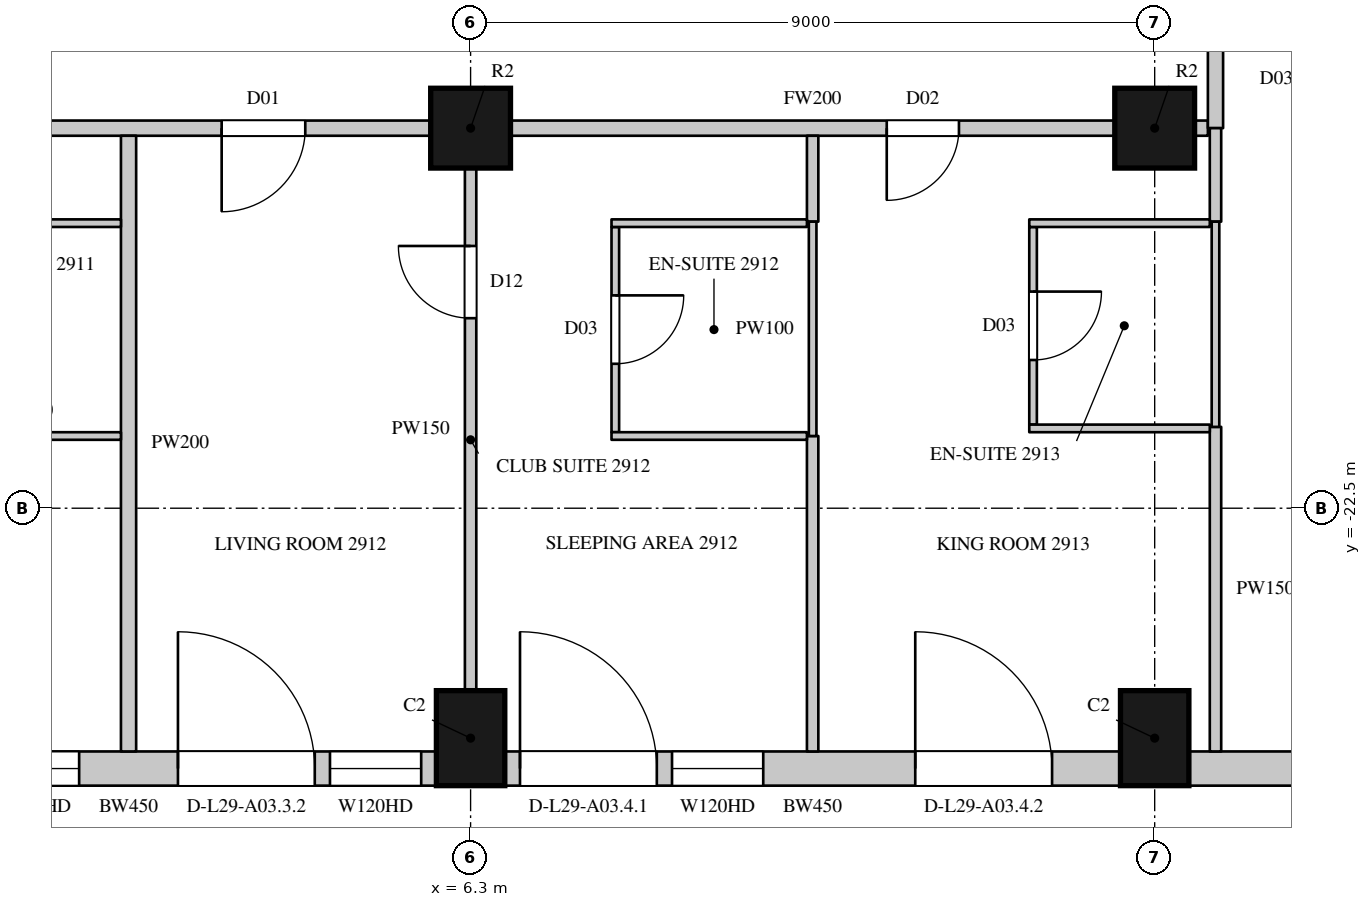
"""IFC4 building model, lengths in metres.
Left out: names, types, materials, properties, quantities, classifications, styles, units other than length and angle.
Written with IfcOpenShell. Run it as: python <this file> out.ifc"""

import sys

from ifc_helpers import new_model, si_unit, direction, frame, frame_2d, origin, origin_2d, place, context, subcontext, project, spatial, rectangle, circle, extrude, element, fill, save


model = new_model("IFC4")
c1 = context("Model", 3, precision=1e-05, world=origin(), true_north=direction((0.0, 1.0)))
c2 = subcontext(c1, "Body", "Model", "MODEL_VIEW")
j1 = project(units=[si_unit("LENGTHUNIT", "METRE"), si_unit("PLANEANGLEUNIT", "RADIAN")], contexts=[c1])
p1 = place(None, origin())
s1 = spatial("IfcSite", under=j1, at=p1, CompositionType="ELEMENT")
p2 = place(p1, origin())
s2 = spatial("IfcBuilding", under=s1, at=p2, CompositionType="ELEMENT")
p3 = place(p2, frame((0.0, 0.0, 134.7)))
s3 = spatial("IfcBuildingStorey", under=s2, at=p3, CompositionType="ELEMENT", Elevation=134.7)
for number, where, z_axis, x_axis in (
    (1, (6.3, -25.525, 0.0), (0.0, 0.0, 1.0), (1.0, 0.0, 0.0)),
    (2, (15.3, -25.525, 0.0), (0.0, 0.0, 1.0), (1.0, 0.0, 0.0)),
):
    element("IfcColumn", number, at=place(p3, frame(where, z_axis=z_axis, x_axis=x_axis)), inside=s3, PredefinedType="COLUMN", context=c2, shape_type="SweptSolid", body=[
        extrude(rectangle(XDim=0.9, YDim=1.25, at=origin_2d()), origin(), (0.0, 0.0, 1.0), 3.6),
    ])
for number, where, z_axis, x_axis in (
    (3, (6.3, -17.5, 0.0), (0.0, 0.0, 1.0), (1.0, 0.0, 0.0)),
    (4, (15.3, -17.5, 0.0), (0.0, 0.0, 1.0), (1.0, 0.0, 0.0)),
):
    element("IfcColumn", number, at=place(p3, frame(where, z_axis=z_axis, x_axis=x_axis)), inside=s3, PredefinedType="COLUMN", context=c2, shape_type="SweptSolid", body=[
        extrude(circle(Radius=0.525, at=origin_2d()), origin(), (0.0, 0.0, 1.0), 3.6),
    ])
p4 = place(p3, frame((-2.25, -25.925, 0.0), z_axis=(0.0, 0.0, 1.0), x_axis=(1.0, 0.0, 0.0)))
e5 = element("IfcWall", 5, at=p4, inside=s3, PredefinedType="SOLIDWALL", context=c2, shape_type="SweptSolid", body=[
    extrude(rectangle(XDim=8.1, YDim=0.45, at=frame_2d((4.05, 0.0))), origin(), (0.0, 0.0, 1.0), 3.3),
])
p5 = place(p4, frame((0.2, 0.0, 0.0)))
e6 = element("IfcOpeningElement", 6, at=p5, cuts=e5, PredefinedType="OPENING", context=c2, shape_type="SweptSolid", body=[
    extrude(rectangle(XDim=1.8, YDim=2.4, at=frame_2d((0.9, 1.2))), frame((0.0, 0.235, 0.0), z_axis=(0.0, -1.0, 0.0), x_axis=(1.0, 0.0, 0.0)), (0.0, 0.0, 1.0), 0.47),
])
p6 = place(p4, frame((2.2, 0.0, 1.05)))
e7 = element("IfcOpeningElement", 7, at=p6, cuts=e5, PredefinedType="OPENING", context=c2, shape_type="SweptSolid", body=[
    extrude(rectangle(XDim=1.2, YDim=2.0, at=frame_2d((0.6, 1.0))), frame((0.0, 0.235, 0.0), z_axis=(0.0, -1.0, 0.0), x_axis=(1.0, 0.0, 0.0)), (0.0, 0.0, 1.0), 0.47),
])
p7 = place(p4, frame((4.7, 0.0, 0.0)))
e8 = element("IfcOpeningElement", 8, at=p7, cuts=e5, PredefinedType="OPENING", context=c2, shape_type="SweptSolid", body=[
    extrude(rectangle(XDim=1.8, YDim=2.4, at=frame_2d((0.9, 1.2))), frame((0.0, 0.235, 0.0), z_axis=(0.0, -1.0, 0.0), x_axis=(1.0, 0.0, 0.0)), (0.0, 0.0, 1.0), 0.47),
])
p8 = place(p4, frame((6.7, 0.0, 1.05)))
e9 = element("IfcOpeningElement", 9, at=p8, cuts=e5, PredefinedType="OPENING", context=c2, shape_type="SweptSolid", body=[
    extrude(rectangle(XDim=1.2, YDim=2.0, at=frame_2d((0.6, 1.0))), frame((0.0, 0.235, 0.0), z_axis=(0.0, -1.0, 0.0), x_axis=(1.0, 0.0, 0.0)), (0.0, 0.0, 1.0), 0.47),
])
p9 = place(p3, frame((6.75, -25.925, 0.0), z_axis=(0.0, 0.0, 1.0), x_axis=(1.0, 0.0, 0.0)))
e10 = element("IfcWall", 10, at=p9, inside=s3, PredefinedType="SOLIDWALL", context=c2, shape_type="SweptSolid", body=[
    extrude(rectangle(XDim=8.1, YDim=0.45, at=frame_2d((4.05, 0.0))), origin(), (0.0, 0.0, 1.0), 3.3),
])
p10 = place(p9, frame((0.2, 0.0, 0.0)))
e11 = element("IfcOpeningElement", 11, at=p10, cuts=e10, PredefinedType="OPENING", context=c2, shape_type="SweptSolid", body=[
    extrude(rectangle(XDim=1.8, YDim=2.4, at=frame_2d((0.9, 1.2))), frame((0.0, 0.235, 0.0), z_axis=(0.0, -1.0, 0.0), x_axis=(1.0, 0.0, 0.0)), (0.0, 0.0, 1.0), 0.47),
])
p11 = place(p9, frame((2.2, 0.0, 1.05)))
e12 = element("IfcOpeningElement", 12, at=p11, cuts=e10, PredefinedType="OPENING", context=c2, shape_type="SweptSolid", body=[
    extrude(rectangle(XDim=1.2, YDim=2.0, at=frame_2d((0.6, 1.0))), frame((0.0, 0.235, 0.0), z_axis=(0.0, -1.0, 0.0), x_axis=(1.0, 0.0, 0.0)), (0.0, 0.0, 1.0), 0.47),
])
p12 = place(p9, frame((5.4, 0.0, 0.0)))
e13 = element("IfcOpeningElement", 13, at=p12, cuts=e10, PredefinedType="OPENING", context=c2, shape_type="SweptSolid", body=[
    extrude(rectangle(XDim=1.8, YDim=2.4, at=frame_2d((0.9, 1.2))), frame((0.0, 0.235, 0.0), z_axis=(0.0, -1.0, 0.0), x_axis=(1.0, 0.0, 0.0)), (0.0, 0.0, 1.0), 0.47),
])
p13 = place(p3, frame((15.75, -25.925, 0.0), z_axis=(0.0, 0.0, 1.0), x_axis=(1.0, 0.0, 0.0)))
e14 = element("IfcWall", 14, at=p13, inside=s3, PredefinedType="SOLIDWALL", context=c2, shape_type="SweptSolid", body=[
    extrude(rectangle(XDim=2.914, YDim=0.45, at=frame_2d((1.457, 0.0))), origin(), (0.0, 0.0, 1.0), 3.3),
])
p14 = place(p3, frame((-2.175, -17.5, 0.0), z_axis=(0.0, 0.0, 1.0), x_axis=(1.0, 0.0, 0.0)))
e15 = element("IfcWall", 15, at=p14, inside=s3, PredefinedType="PARTITIONING", context=c2, shape_type="SweptSolid", body=[
    extrude(rectangle(XDim=7.95, YDim=0.2, at=frame_2d((3.975, 0.0))), origin(), (0.0, 0.0, 1.0), 2.75),
])
p15 = place(p14, frame((5.2, 0.0, 0.0)))
e16 = element("IfcOpeningElement", 16, at=p15, cuts=e15, PredefinedType="OPENING", context=c2, shape_type="SweptSolid", body=[
    extrude(rectangle(XDim=1.1, YDim=2.4, at=frame_2d((0.55, 1.2))), frame((0.0, 0.11, 0.0), z_axis=(0.0, -1.0, 0.0), x_axis=(1.0, 0.0, 0.0)), (0.0, 0.0, 1.0), 0.22),
])
p16 = place(p3, frame((6.825, -17.5, 0.0), z_axis=(0.0, 0.0, 1.0), x_axis=(1.0, 0.0, 0.0)))
e17 = element("IfcWall", 17, at=p16, inside=s3, PredefinedType="PARTITIONING", context=c2, shape_type="SweptSolid", body=[
    extrude(rectangle(XDim=7.95, YDim=0.2, at=frame_2d((3.975, 0.0))), origin(), (0.0, 0.0, 1.0), 2.75),
])
p17 = place(p16, frame((4.95, 0.0, 0.0)))
e18 = element("IfcOpeningElement", 18, at=p17, cuts=e17, PredefinedType="OPENING", context=c2, shape_type="SweptSolid", body=[
    extrude(rectangle(XDim=0.95, YDim=2.2, at=frame_2d((0.475, 1.1))), frame((0.0, 0.11, 0.0), z_axis=(0.0, -1.0, 0.0), x_axis=(1.0, 0.0, 0.0)), (0.0, 0.0, 1.0), 0.22),
])
p18 = place(p3, frame((15.825, -17.5, 0.0), z_axis=(0.0, 0.0, 1.0), x_axis=(1.0, 0.0, 0.0)))
e19 = element("IfcWall", 19, at=p18, inside=s3, PredefinedType="PARTITIONING", context=c2, shape_type="SweptSolid", body=[
    extrude(rectangle(XDim=0.175, YDim=0.2, at=frame_2d((0.087, 0.0))), origin(), (0.0, 0.0, 1.0), 3.3),
])
p19 = place(p3, frame((16.1, -17.5, 0.0), z_axis=(0.0, 0.0, 1.0), x_axis=(0.0, 1.0, 0.0)))
e20 = element("IfcWall", 20, at=p19, inside=s3, PredefinedType="PARTITIONING", context=c2, shape_type="SweptSolid", body=[
    extrude(rectangle(XDim=12.75, YDim=0.2, at=frame_2d((6.375, 0.0))), origin(), (0.0, 0.0, 1.0), 3.3),
])
p20 = place(p19, frame((2.75, 0.0, 0.0)))
e21 = element("IfcOpeningElement", 21, at=p20, cuts=e20, PredefinedType="OPENING", context=c2, shape_type="SweptSolid", body=[
    extrude(rectangle(XDim=0.95, YDim=2.2, at=frame_2d((0.475, 1.1))), frame((0.0, 0.11, 0.0), z_axis=(0.0, -1.0, 0.0), x_axis=(1.0, 0.0, 0.0)), (0.0, 0.0, 1.0), 0.22),
])
p21 = place(p19, frame((6.95, 0.0, 0.0)))
e22 = element("IfcOpeningElement", 22, at=p21, cuts=e20, PredefinedType="OPENING", context=c2, shape_type="SweptSolid", body=[
    extrude(rectangle(XDim=0.95, YDim=2.2, at=frame_2d((0.475, 1.1))), frame((0.0, 0.11, 0.0), z_axis=(0.0, -1.0, 0.0), x_axis=(1.0, 0.0, 0.0)), (0.0, 0.0, 1.0), 0.22),
])
p22 = place(p19, frame((11.4, 0.0, 0.0)))
e23 = element("IfcOpeningElement", 23, at=p22, cuts=e20, PredefinedType="OPENING", context=c2, shape_type="SweptSolid", body=[
    extrude(rectangle(XDim=0.95, YDim=2.2, at=frame_2d((0.475, 1.1))), frame((0.0, 0.11, 0.0), z_axis=(0.0, -1.0, 0.0), x_axis=(1.0, 0.0, 0.0)), (0.0, 0.0, 1.0), 0.22),
])
p23 = place(p3, frame((6.3, -24.9, 0.0), z_axis=(0.0, 0.0, 1.0), x_axis=(0.0, 1.0, 0.0)))
e24 = element("IfcWall", 24, at=p23, inside=s3, PredefinedType="PARTITIONING", context=c2, shape_type="SweptSolid", body=[
    extrude(rectangle(XDim=6.875, YDim=0.15, at=frame_2d((3.438, 0.0))), origin(), (0.0, 0.0, 1.0), 2.75),
])
p24 = place(p23, frame((4.9, 0.0, 0.0)))
e25 = element("IfcOpeningElement", 25, at=p24, cuts=e24, PredefinedType="OPENING", context=c2, shape_type="SweptSolid", body=[
    extrude(rectangle(XDim=0.95, YDim=2.2, at=frame_2d((0.475, 1.1))), frame((0.0, 0.085, 0.0), z_axis=(0.0, -1.0, 0.0), x_axis=(1.0, 0.0, 0.0)), (0.0, 0.0, 1.0), 0.17),
])
p25 = place(p3, frame((10.8, -25.7, 0.0), z_axis=(0.0, 0.0, 1.0), x_axis=(0.0, 1.0, 0.0)))
e26 = element("IfcWall", 26, at=p25, inside=s3, PredefinedType="PARTITIONING", context=c2, shape_type="SweptSolid", body=[
    extrude(rectangle(XDim=4.15, YDim=0.15, at=frame_2d((2.075, 0.0))), origin(), (0.0, 0.0, 1.0), 2.65),
])
p26 = place(p3, frame((10.8, -18.73, 0.0), z_axis=(0.0, 0.0, 1.0), x_axis=(0.0, 1.0, 0.0)))
e27 = element("IfcWall", 27, at=p26, inside=s3, PredefinedType="PARTITIONING", context=c2, shape_type="SweptSolid", body=[
    extrude(rectangle(XDim=1.13, YDim=0.15, at=frame_2d((0.565, 0.0))), origin(), (0.0, 0.0, 1.0), 2.65),
])
p27 = place(p3, frame((16.1, -25.7, 0.0), z_axis=(0.0, 0.0, 1.0), x_axis=(0.0, 1.0, 0.0)))
e28 = element("IfcWall", 28, at=p27, inside=s3, PredefinedType="PARTITIONING", context=c2, shape_type="SweptSolid", body=[
    extrude(rectangle(XDim=4.27, YDim=0.15, at=frame_2d((2.135, 0.0))), origin(), (0.0, 0.0, 1.0), 3.3),
])
p28 = place(p3, frame((16.1, -18.73, 0.0), z_axis=(0.0, 0.0, 1.0), x_axis=(0.0, 1.0, 0.0)))
e29 = element("IfcWall", 29, at=p28, inside=s3, PredefinedType="PARTITIONING", context=c2, shape_type="SweptSolid", body=[
    extrude(rectangle(XDim=1.23, YDim=0.15, at=frame_2d((0.615, 0.0))), origin(), (0.0, 0.0, 1.0), 3.3),
])
p29 = place(p3, frame((1.8, -25.7, 0.0), z_axis=(0.0, 0.0, 1.0), x_axis=(0.0, 1.0, 0.0)))
e30 = element("IfcWall", 30, at=p29, inside=s3, PredefinedType="PARTITIONING", context=c2, shape_type="SweptSolid", body=[
    extrude(rectangle(XDim=8.1, YDim=0.2, at=frame_2d((4.05, 0.0))), origin(), (0.0, 0.0, 1.0), 2.65),
])
for number, where, z_axis, x_axis in (
    (31, (-0.846, -21.55, 0.0), (0.0, 0.0, 1.0), (1.0, 0.0, 0.0)),
    (32, (-0.846, -18.75, 0.0), (0.0, 0.0, 1.0), (1.0, 0.0, 0.0)),
):
    element("IfcWall", number, at=place(p3, frame(where, z_axis=z_axis, x_axis=x_axis)), inside=s3, PredefinedType="PARTITIONING", context=c2, shape_type="SweptSolid", body=[
        extrude(rectangle(XDim=2.546, YDim=0.1, at=frame_2d((1.273, 0.0))), origin(), (0.0, 0.0, 1.0), 3.3),
    ])
p30 = place(p3, frame((8.204, -21.5, 0.0), z_axis=(0.0, 0.0, 1.0), x_axis=(0.0, 1.0, 0.0)))
e33 = element("IfcWall", 33, at=p30, inside=s3, PredefinedType="PARTITIONING", context=c2, shape_type="SweptSolid", body=[
    extrude(rectangle(XDim=2.7, YDim=0.1, at=frame_2d((1.35, 0.0))), origin(), (0.0, 0.0, 1.0), 3.3),
])
p31 = place(p30, frame((0.9, 0.0, 0.0)))
e34 = element("IfcOpeningElement", 34, at=p31, cuts=e33, PredefinedType="OPENING", context=c2, shape_type="SweptSolid", body=[
    extrude(rectangle(XDim=0.9, YDim=2.2, at=frame_2d((0.45, 1.1))), frame((0.0, 0.06, 0.0), z_axis=(0.0, -1.0, 0.0), x_axis=(1.0, 0.0, 0.0)), (0.0, 0.0, 1.0), 0.12),
])
for number, where, z_axis, x_axis in (
    (35, (8.154, -21.55, 0.0), (0.0, 0.0, 1.0), (1.0, 0.0, 0.0)),
    (36, (8.154, -18.75, 0.0), (0.0, 0.0, 1.0), (1.0, 0.0, 0.0)),
):
    element("IfcWall", number, at=place(p3, frame(where, z_axis=z_axis, x_axis=x_axis)), inside=s3, PredefinedType="PARTITIONING", context=c2, shape_type="SweptSolid", body=[
        extrude(rectangle(XDim=2.571, YDim=0.1, at=frame_2d((1.286, 0.0))), origin(), (0.0, 0.0, 1.0), 3.3),
    ])
p32 = place(p3, frame((10.8, -21.55, 0.0), z_axis=(0.0, 0.0, 1.0), x_axis=(0.0, 1.0, 0.0)))
e37 = element("IfcWall", 37, at=p32, inside=s3, PredefinedType="PARTITIONING", context=c2, shape_type="SweptSolid", body=[
    extrude(rectangle(XDim=2.82, YDim=0.1, at=frame_2d((1.41, 0.0))), origin(), (0.0, 0.0, 1.0), 2.65),
])
p33 = place(p3, frame((13.7, -21.4, 0.0), z_axis=(0.0, 0.0, 1.0), x_axis=(0.0, 1.0, 0.0)))
e38 = element("IfcWall", 38, at=p33, inside=s3, PredefinedType="PARTITIONING", context=c2, shape_type="SweptSolid", body=[
    extrude(rectangle(XDim=2.6, YDim=0.1, at=frame_2d((1.3, 0.0))), origin(), (0.0, 0.0, 1.0), 3.3),
])
p34 = place(p33, frame((0.85, 0.0, 0.0)))
e39 = element("IfcOpeningElement", 39, at=p34, cuts=e38, PredefinedType="OPENING", context=c2, shape_type="SweptSolid", body=[
    extrude(rectangle(XDim=0.9, YDim=2.2, at=frame_2d((0.45, 1.1))), frame((0.0, 0.06, 0.0), z_axis=(0.0, -1.0, 0.0), x_axis=(1.0, 0.0, 0.0)), (0.0, 0.0, 1.0), 0.12),
])
for number, where, z_axis, x_axis in (
    (40, (13.65, -21.45, 0.0), (0.0, 0.0, 1.0), (1.0, 0.0, 0.0)),
    (41, (13.65, -18.75, 0.0), (0.0, 0.0, 1.0), (1.0, 0.0, 0.0)),
):
    element("IfcWall", number, at=place(p3, frame(where, z_axis=z_axis, x_axis=x_axis)), inside=s3, PredefinedType="PARTITIONING", context=c2, shape_type="SweptSolid", body=[
        extrude(rectangle(XDim=2.375, YDim=0.1, at=frame_2d((1.188, 0.0))), origin(), (0.0, 0.0, 1.0), 3.3),
    ])
p35 = place(p3, frame((16.1, -21.43, 0.0), z_axis=(0.0, 0.0, 1.0), x_axis=(0.0, 1.0, 0.0)))
e42 = element("IfcWall", 42, at=p35, inside=s3, PredefinedType="PARTITIONING", context=c2, shape_type="SweptSolid", body=[
    extrude(rectangle(XDim=2.7, YDim=0.1, at=frame_2d((1.35, 0.0))), origin(), (0.0, 0.0, 1.0), 3.3),
])
p36 = place(p6, origin())
e43 = element("IfcWindow", 43, at=p36, inside=s3, PartitioningType="SINGLE_PANEL", PredefinedType="WINDOW", context=c2, shape_type="SweptSolid", body=[
    extrude(rectangle(XDim=1.2, YDim=2.0, at=frame_2d((0.6, 1.0))), frame((0.0, 0.135, 0.0), z_axis=(0.0, -1.0, 0.0), x_axis=(1.0, 0.0, 0.0)), (0.0, 0.0, 1.0), 0.06),
])
fill(e7, e43)
p37 = place(p7, origin())
e44 = element("IfcDoor", 44, at=p37, inside=s3, OperationType="SLIDING_TO_LEFT", PredefinedType="DOOR", context=c2, shape_type="SweptSolid", body=[
    extrude(rectangle(XDim=1.8, YDim=2.4, at=frame_2d((0.9, 1.2))), frame((0.0, 0.13, 0.0), z_axis=(0.0, -1.0, 0.0), x_axis=(1.0, 0.0, 0.0)), (0.0, 0.0, 1.0), 0.05),
])
fill(e8, e44)
p38 = place(p8, origin())
e45 = element("IfcWindow", 45, at=p38, inside=s3, PartitioningType="SINGLE_PANEL", PredefinedType="WINDOW", context=c2, shape_type="SweptSolid", body=[
    extrude(rectangle(XDim=1.2, YDim=2.0, at=frame_2d((0.6, 1.0))), frame((0.0, 0.135, 0.0), z_axis=(0.0, -1.0, 0.0), x_axis=(1.0, 0.0, 0.0)), (0.0, 0.0, 1.0), 0.06),
])
fill(e9, e45)
p39 = place(p10, origin())
e46 = element("IfcDoor", 46, at=p39, inside=s3, OperationType="SLIDING_TO_LEFT", PredefinedType="DOOR", context=c2, shape_type="SweptSolid", body=[
    extrude(rectangle(XDim=1.8, YDim=2.4, at=frame_2d((0.9, 1.2))), frame((0.0, 0.13, 0.0), z_axis=(0.0, -1.0, 0.0), x_axis=(1.0, 0.0, 0.0)), (0.0, 0.0, 1.0), 0.05),
])
fill(e11, e46)
p40 = place(p11, origin())
e47 = element("IfcWindow", 47, at=p40, inside=s3, PartitioningType="SINGLE_PANEL", PredefinedType="WINDOW", context=c2, shape_type="SweptSolid", body=[
    extrude(rectangle(XDim=1.2, YDim=2.0, at=frame_2d((0.6, 1.0))), frame((0.0, 0.135, 0.0), z_axis=(0.0, -1.0, 0.0), x_axis=(1.0, 0.0, 0.0)), (0.0, 0.0, 1.0), 0.06),
])
fill(e12, e47)
p41 = place(p12, origin())
e48 = element("IfcDoor", 48, at=p41, inside=s3, OperationType="SLIDING_TO_LEFT", PredefinedType="DOOR", context=c2, shape_type="SweptSolid", body=[
    extrude(rectangle(XDim=1.8, YDim=2.4, at=frame_2d((0.9, 1.2))), frame((0.0, 0.13, 0.0), z_axis=(0.0, -1.0, 0.0), x_axis=(1.0, 0.0, 0.0)), (0.0, 0.0, 1.0), 0.05),
])
fill(e13, e48)
p42 = place(p15, origin())
e49 = element("IfcDoor", 49, at=p42, inside=s3, OperationType="SINGLE_SWING_RIGHT", PredefinedType="DOOR", context=c2, shape_type="SweptSolid", body=[
    extrude(rectangle(XDim=1.1, YDim=2.4, at=frame_2d((0.55, 1.2))), frame((0.0, 0.025, 0.0), z_axis=(0.0, -1.0, 0.0), x_axis=(1.0, 0.0, 0.0)), (0.0, 0.0, 1.0), 0.05),
])
fill(e16, e49)
p43 = place(p24, origin())
e50 = element("IfcDoor", 50, at=p43, inside=s3, OperationType="SINGLE_SWING_RIGHT", PredefinedType="DOOR", context=c2, shape_type="SweptSolid", body=[
    extrude(rectangle(XDim=0.95, YDim=2.2, at=frame_2d((0.475, 1.1))), frame((0.0, 0.025, 0.0), z_axis=(0.0, -1.0, 0.0), x_axis=(1.0, 0.0, 0.0)), (0.0, 0.0, 1.0), 0.05),
])
fill(e25, e50)
p44 = place(p31, origin())
e51 = element("IfcDoor", 51, at=p44, inside=s3, OperationType="SINGLE_SWING_LEFT", PredefinedType="DOOR", context=c2, shape_type="SweptSolid", body=[
    extrude(rectangle(XDim=0.9, YDim=2.2, at=frame_2d((0.45, 1.1))), frame((0.0, 0.025, 0.0), z_axis=(0.0, -1.0, 0.0), x_axis=(1.0, 0.0, 0.0)), (0.0, 0.0, 1.0), 0.05),
])
fill(e34, e51)
p45 = place(p17, origin())
e52 = element("IfcDoor", 52, at=p45, inside=s3, OperationType="SINGLE_SWING_RIGHT", PredefinedType="DOOR", context=c2, shape_type="SweptSolid", body=[
    extrude(rectangle(XDim=0.95, YDim=2.2, at=frame_2d((0.475, 1.1))), frame((0.0, 0.025, 0.0), z_axis=(0.0, -1.0, 0.0), x_axis=(1.0, 0.0, 0.0)), (0.0, 0.0, 1.0), 0.05),
])
fill(e18, e52)
p46 = place(p34, origin())
e53 = element("IfcDoor", 53, at=p46, inside=s3, OperationType="SINGLE_SWING_LEFT", PredefinedType="DOOR", context=c2, shape_type="SweptSolid", body=[
    extrude(rectangle(XDim=0.9, YDim=2.2, at=frame_2d((0.45, 1.1))), frame((0.0, 0.025, 0.0), z_axis=(0.0, -1.0, 0.0), x_axis=(1.0, 0.0, 0.0)), (0.0, 0.0, 1.0), 0.05),
])
fill(e39, e53)
save(model, sys.argv[1])
